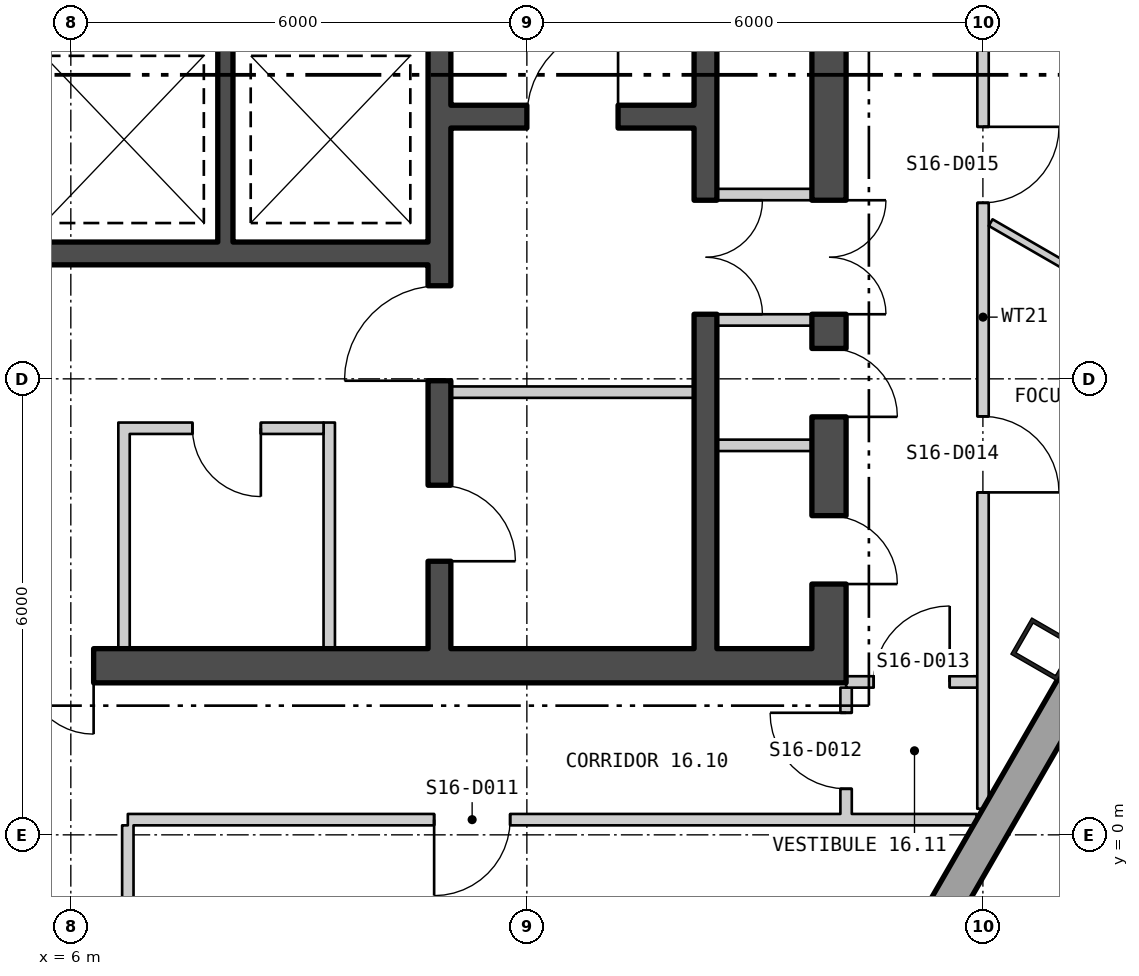
"""IFC4 building model, lengths in metres.
Left out: names, types, materials, properties, quantities, classifications, styles, units other than length and angle.
Written with IfcOpenShell. Run it as: python <this file> out.ifc"""

import sys

from ifc_helpers import new_model, si_unit, direction, frame, frame_2d, origin, origin_2d, place, context, subcontext, project, spatial, polyline, rectangle, hollow_rectangle, outline, extrude, element, fill, save


model = new_model("IFC4")
c1 = context("Model", 3, precision=1e-05, world=origin(), true_north=direction((0.0, 1.0)))
c2 = subcontext(c1, "Body", "Model", "MODEL_VIEW")
j1 = project(units=[si_unit("LENGTHUNIT", "METRE"), si_unit("PLANEANGLEUNIT", "RADIAN")], contexts=[c1])
p1 = place(None, origin())
s1 = spatial("IfcSite", under=j1, at=p1, CompositionType="ELEMENT")
p2 = place(p1, origin())
s2 = spatial("IfcBuilding", under=s1, at=p2, CompositionType="ELEMENT")
p3 = place(p2, frame((0.0, 0.0, 216.0)))
s3 = spatial("IfcBuildingStorey", under=s2, at=p3, CompositionType="ELEMENT", Elevation=216.0)
p4 = place(p3, frame((18.808, 2.441, 0.0), z_axis=(0.0, 0.0, 1.0), x_axis=(0.5, 0.866025403784, 0.0)))
e1 = element("IfcColumn", 1, at=p4, inside=s3, PredefinedType="COLUMN", context=c2, shape_type="SweptSolid", body=[
    extrude(hollow_rectangle(XDim=0.55, YDim=0.7, WallThickness=0.05, at=origin_2d()), origin(), (0.0, 0.0, 1.0), 3.9),
])
p5 = place(p3, frame((3.36, -25.466, -0.18), z_axis=(0.0, 0.0, 1.0), x_axis=(0.500000335318, 0.866025210188, 0.0)))
e2 = element("IfcWall", 2, at=p5, inside=s3, PredefinedType="SOLIDWALL", context=c2, shape_type="SweptSolid", body=[
    extrude(outline(polyline([(-0.13, -0.225), (45.88, -0.225), (45.62, 0.225), (0.13, 0.225), (-0.13, -0.225)])), origin(), (0.0, 0.0, 1.0), 3.68),
])
p6 = place(p5, frame((1.425, 0.0, 1.08)))
e3 = element("IfcOpeningElement", 3, at=p6, cuts=e2, PredefinedType="OPENING", context=c2, shape_type="SweptSolid", body=[
    extrude(rectangle(XDim=2.4, YDim=2.0, at=frame_2d((1.2, 1.0))), frame((0.0, 0.235, 0.0), z_axis=(0.0, -1.0, 0.0), x_axis=(1.0, 0.0, 0.0)), (0.0, 0.0, 1.0), 0.47),
])
p7 = place(p5, frame((5.895, 0.0, 1.08)))
e4 = element("IfcOpeningElement", 4, at=p7, cuts=e2, PredefinedType="OPENING", context=c2, shape_type="SweptSolid", body=[
    extrude(rectangle(XDim=2.4, YDim=2.0, at=frame_2d((1.2, 1.0))), frame((0.0, 0.235, 0.0), z_axis=(0.0, -1.0, 0.0), x_axis=(1.0, 0.0, 0.0)), (0.0, 0.0, 1.0), 0.47),
])
p8 = place(p5, frame((10.403, 0.0, 1.08)))
e5 = element("IfcOpeningElement", 5, at=p8, cuts=e2, PredefinedType="OPENING", context=c2, shape_type="SweptSolid", body=[
    extrude(rectangle(XDim=2.4, YDim=2.0, at=frame_2d((1.2, 1.0))), frame((0.0, 0.235, 0.0), z_axis=(0.0, -1.0, 0.0), x_axis=(1.0, 0.0, 0.0)), (0.0, 0.0, 1.0), 0.47),
])
p9 = place(p5, frame((14.912, 0.0, 1.08)))
e6 = element("IfcOpeningElement", 6, at=p9, cuts=e2, PredefinedType="OPENING", context=c2, shape_type="SweptSolid", body=[
    extrude(rectangle(XDim=2.4, YDim=2.0, at=frame_2d((1.2, 1.0))), frame((0.0, 0.235, 0.0), z_axis=(0.0, -1.0, 0.0), x_axis=(1.0, 0.0, 0.0)), (0.0, 0.0, 1.0), 0.47),
])
p10 = place(p5, frame((19.421, 0.0, 1.08)))
e7 = element("IfcOpeningElement", 7, at=p10, cuts=e2, PredefinedType="OPENING", context=c2, shape_type="SweptSolid", body=[
    extrude(rectangle(XDim=2.4, YDim=2.0, at=frame_2d((1.2, 1.0))), frame((0.0, 0.235, 0.0), z_axis=(0.0, -1.0, 0.0), x_axis=(1.0, 0.0, 0.0)), (0.0, 0.0, 1.0), 0.47),
])
p11 = place(p5, frame((23.929, 0.0, 1.08)))
e8 = element("IfcOpeningElement", 8, at=p11, cuts=e2, PredefinedType="OPENING", context=c2, shape_type="SweptSolid", body=[
    extrude(rectangle(XDim=2.4, YDim=2.0, at=frame_2d((1.2, 1.0))), frame((0.0, 0.235, 0.0), z_axis=(0.0, -1.0, 0.0), x_axis=(1.0, 0.0, 0.0)), (0.0, 0.0, 1.0), 0.47),
])
p12 = place(p5, frame((32.947, 0.0, 1.08)))
e9 = element("IfcOpeningElement", 9, at=p12, cuts=e2, PredefinedType="OPENING", context=c2, shape_type="SweptSolid", body=[
    extrude(rectangle(XDim=2.4, YDim=2.0, at=frame_2d((1.2, 1.0))), frame((0.0, 0.235, 0.0), z_axis=(0.0, -1.0, 0.0), x_axis=(1.0, 0.0, 0.0)), (0.0, 0.0, 1.0), 0.47),
])
p13 = place(p5, frame((37.455, 0.0, 1.08)))
e10 = element("IfcOpeningElement", 10, at=p13, cuts=e2, PredefinedType="OPENING", context=c2, shape_type="SweptSolid", body=[
    extrude(rectangle(XDim=2.4, YDim=2.0, at=frame_2d((1.2, 1.0))), frame((0.0, 0.235, 0.0), z_axis=(0.0, -1.0, 0.0), x_axis=(1.0, 0.0, 0.0)), (0.0, 0.0, 1.0), 0.47),
])
p14 = place(p5, frame((41.925, 0.0, 1.08)))
e11 = element("IfcOpeningElement", 11, at=p14, cuts=e2, PredefinedType="OPENING", context=c2, shape_type="SweptSolid", body=[
    extrude(rectangle(XDim=2.4, YDim=2.0, at=frame_2d((1.2, 1.0))), frame((0.0, 0.235, 0.0), z_axis=(0.0, -1.0, 0.0), x_axis=(1.0, 0.0, 0.0)), (0.0, 0.0, 1.0), 0.47),
])
p15 = place(p3, frame((-16.2, 2.225, 0.0), z_axis=(0.0, 0.0, 1.0), x_axis=(1.0, 0.0, 0.0)))
e12 = element("IfcWall", 12, at=p15, inside=s3, PredefinedType="SHEAR", context=c2, shape_type="SweptSolid", body=[
    extrude(rectangle(XDim=32.4, YDim=0.45, at=frame_2d((16.2, 0.0))), origin(), (0.0, 0.0, 1.0), 3.7),
])
p16 = place(p15, frame((10.7, 0.0, 0.0)))
e13 = element("IfcOpeningElement", 13, at=p16, cuts=e12, PredefinedType="OPENING", context=c2, shape_type="SweptSolid", body=[
    extrude(rectangle(XDim=1.8, YDim=2.4, at=frame_2d((0.9, 1.2))), frame((0.0, 0.235, 0.0), z_axis=(0.0, -1.0, 0.0), x_axis=(1.0, 0.0, 0.0)), (0.0, 0.0, 1.0), 0.47),
])
p17 = place(p15, frame((20.7, 0.0, 0.0)))
e14 = element("IfcOpeningElement", 14, at=p17, cuts=e12, PredefinedType="OPENING", context=c2, shape_type="SweptSolid", body=[
    extrude(rectangle(XDim=1.8, YDim=2.4, at=frame_2d((0.9, 1.2))), frame((0.0, 0.235, 0.0), z_axis=(0.0, -1.0, 0.0), x_axis=(1.0, 0.0, 0.0)), (0.0, 0.0, 1.0), 0.47),
])
p18 = place(p3, frame((15.975, 2.45, 0.0), z_axis=(0.0, 0.0, 1.0), x_axis=(0.0, 1.0, 0.0)))
e15 = element("IfcWall", 15, at=p18, inside=s3, PredefinedType="SHEAR", context=c2, shape_type="SweptSolid", body=[
    extrude(rectangle(XDim=15.1, YDim=0.45, at=frame_2d((7.55, 0.0))), origin(), (0.0, 0.0, 1.0), 3.7),
])
p19 = place(p18, frame((4.4, 0.0, 0.0)))
e16 = element("IfcOpeningElement", 16, at=p19, cuts=e15, PredefinedType="OPENING", context=c2, shape_type="SweptSolid", body=[
    extrude(rectangle(XDim=1.5, YDim=2.1, at=frame_2d((0.75, 1.05))), frame((0.0, 0.235, 0.0), z_axis=(0.0, -1.0, 0.0), x_axis=(1.0, 0.0, 0.0)), (0.0, 0.0, 1.0), 0.47),
])
p20 = place(p18, frame((0.85, 0.0, 0.0)))
e17 = element("IfcOpeningElement", 17, at=p20, cuts=e15, PredefinedType="OPENING", context=c2, shape_type="SweptSolid", body=[
    extrude(rectangle(XDim=0.9, YDim=2.1, at=frame_2d((0.45, 1.05))), frame((0.0, 0.235, 0.0), z_axis=(0.0, -1.0, 0.0), x_axis=(1.0, 0.0, 0.0)), (0.0, 0.0, 1.0), 0.47),
])
p21 = place(p18, frame((3.05, 0.0, 0.0)))
e18 = element("IfcOpeningElement", 18, at=p21, cuts=e15, PredefinedType="OPENING", context=c2, shape_type="SweptSolid", body=[
    extrude(rectangle(XDim=0.9, YDim=2.1, at=frame_2d((0.45, 1.05))), frame((0.0, 0.235, 0.0), z_axis=(0.0, -1.0, 0.0), x_axis=(1.0, 0.0, 0.0)), (0.0, 0.0, 1.0), 0.47),
])
p22 = place(p18, frame((9.029, 0.0, 0.0)))
e19 = element("IfcOpeningElement", 19, at=p22, cuts=e15, PredefinedType="OPENING", context=c2, shape_type="SweptSolid", body=[
    extrude(rectangle(XDim=0.9, YDim=2.1, at=frame_2d((0.45, 1.05))), frame((0.0, 0.235, 0.0), z_axis=(0.0, -1.0, 0.0), x_axis=(1.0, 0.0, 0.0)), (0.0, 0.0, 1.0), 0.47),
])
p23 = place(p18, frame((13.579, 0.0, 0.0)))
e20 = element("IfcOpeningElement", 20, at=p23, cuts=e15, PredefinedType="OPENING", context=c2, shape_type="SweptSolid", body=[
    extrude(rectangle(XDim=1.0, YDim=2.1, at=frame_2d((0.5, 1.05))), frame((0.0, 0.235, 0.0), z_axis=(0.0, -1.0, 0.0), x_axis=(1.0, 0.0, 0.0)), (0.0, 0.0, 1.0), 0.47),
])
p24 = place(p3, frame((10.85, 2.45, 0.0), z_axis=(0.0, 0.0, 1.0), x_axis=(0.0, 1.0, 0.0)))
e21 = element("IfcWall", 21, at=p24, inside=s3, PredefinedType="SHEAR", context=c2, shape_type="SweptSolid", body=[
    extrude(rectangle(XDim=15.1, YDim=0.3, at=frame_2d((7.55, 0.0))), origin(), (0.0, 0.0, 1.0), 3.7),
])
p25 = place(p24, frame((3.525, 0.0, 0.0)))
e22 = element("IfcOpeningElement", 22, at=p25, cuts=e21, PredefinedType="OPENING", context=c2, shape_type="SweptSolid", body=[
    extrude(rectangle(XDim=1.25, YDim=2.1, at=frame_2d((0.625, 1.05))), frame((0.0, 0.16, 0.0), z_axis=(0.0, -1.0, 0.0), x_axis=(1.0, 0.0, 0.0)), (0.0, 0.0, 1.0), 0.32),
])
p26 = place(p24, frame((1.15, 0.0, 0.0)))
e23 = element("IfcOpeningElement", 23, at=p26, cuts=e21, PredefinedType="OPENING", context=c2, shape_type="SweptSolid", body=[
    extrude(rectangle(XDim=1.0, YDim=2.1, at=frame_2d((0.5, 1.05))), frame((0.0, 0.16, 0.0), z_axis=(0.0, -1.0, 0.0), x_axis=(1.0, 0.0, 0.0)), (0.0, 0.0, 1.0), 0.32),
])
p27 = place(p3, frame((14.35, 2.45, 0.0), z_axis=(0.0, 0.0, 1.0), x_axis=(0.0, 1.0, 0.0)))
e24 = element("IfcWall", 24, at=p27, inside=s3, PredefinedType="SHEAR", context=c2, shape_type="SweptSolid", body=[
    extrude(rectangle(XDim=15.1, YDim=0.3, at=frame_2d((7.55, 0.0))), origin(), (0.0, 0.0, 1.0), 3.7),
])
p28 = place(p27, frame((4.4, 0.0, 0.0)))
e25 = element("IfcOpeningElement", 25, at=p28, cuts=e24, PredefinedType="OPENING", context=c2, shape_type="SweptSolid", body=[
    extrude(rectangle(XDim=1.5, YDim=2.1, at=frame_2d((0.75, 1.05))), frame((0.0, 0.16, 0.0), z_axis=(0.0, -1.0, 0.0), x_axis=(1.0, 0.0, 0.0)), (0.0, 0.0, 1.0), 0.32),
])
p29 = place(p3, frame((11.0, 9.45, 0.0), z_axis=(0.0, 0.0, 1.0), x_axis=(1.0, 0.0, 0.0)))
e26 = element("IfcWall", 26, at=p29, inside=s3, PredefinedType="SHEAR", context=c2, shape_type="SweptSolid", body=[
    extrude(rectangle(XDim=3.2, YDim=0.3, at=frame_2d((1.6, 0.0))), origin(), (0.0, 0.0, 1.0), 3.7),
])
p30 = place(p29, frame((1.0, 0.0, 0.0)))
e27 = element("IfcOpeningElement", 27, at=p30, cuts=e26, PredefinedType="OPENING", context=c2, shape_type="SweptSolid", body=[
    extrude(rectangle(XDim=1.2, YDim=2.1, at=frame_2d((0.6, 1.05))), frame((0.0, 0.16, 0.0), z_axis=(0.0, -1.0, 0.0), x_axis=(1.0, 0.0, 0.0)), (0.0, 0.0, 1.0), 0.32),
])
p31 = place(p3, frame((2.6, 7.65, 0.0), z_axis=(0.0, 0.0, 1.0), x_axis=(1.0, 0.0, 0.0)))
e28 = element("IfcWall", 28, at=p31, inside=s3, PredefinedType="SHEAR", context=c2, shape_type="SweptSolid", body=[
    extrude(rectangle(XDim=8.1, YDim=0.3, at=frame_2d((4.05, 0.0))), origin(), (0.0, 0.0, 1.0), 3.7),
])
p32 = place(p3, frame((8.033, 7.8, 0.0), z_axis=(0.0, 0.0, 1.0), x_axis=(0.0, 1.0, 0.0)))
e29 = element("IfcWall", 29, at=p32, inside=s3, PredefinedType="SHEAR", context=c2, shape_type="SweptSolid", body=[
    extrude(rectangle(XDim=2.7, YDim=0.2, at=frame_2d((1.35, 0.0))), origin(), (0.0, 0.0, 1.0), 3.7),
])
p33 = place(p3, frame((11.0, 5.825, 0.0), z_axis=(0.0, 0.0, 1.0), x_axis=(1.0, 0.0, 0.0)))
e30 = element("IfcWall", 30, at=p33, inside=s3, PredefinedType="PARTITIONING", context=c2, shape_type="SweptSolid", body=[
    extrude(rectangle(XDim=3.2, YDim=0.15, at=frame_2d((1.6, 0.0))), origin(), (0.0, 0.0, 1.0), 3.7),
])
for number, where, z_axis, x_axis in (
    (31, (14.5, 6.775, 0.0), (0.0, 0.0, 1.0), (1.0, 0.0, 0.0)),
    (32, (14.5, 8.425, 0.0), (0.0, 0.0, 1.0), (1.0, 0.0, 0.0)),
    (33, (14.5, 5.125, 0.0), (0.0, 0.0, 1.0), (1.0, 0.0, 0.0)),
):
    element("IfcWall", number, at=place(p3, frame(where, z_axis=z_axis, x_axis=x_axis)), inside=s3, PredefinedType="PARTITIONING", context=c2, shape_type="SweptSolid", body=[
        extrude(rectangle(XDim=1.25, YDim=0.15, at=frame_2d((0.625, 0.0))), origin(), (0.0, 0.0, 1.0), 3.7),
    ])
for number, where, z_axis, x_axis in (
    (34, (6.7, 2.45, 0.0), (0.0, 0.0, 1.0), (0.0, 1.0, 0.0)),
    (35, (9.4, 2.45, 0.0), (0.0, 0.0, 1.0), (0.0, 1.0, 0.0)),
):
    element("IfcWall", number, at=place(p3, frame(where, z_axis=z_axis, x_axis=x_axis)), inside=s3, PredefinedType="PARTITIONING", context=c2, shape_type="SweptSolid", body=[
        extrude(rectangle(XDim=2.975, YDim=0.15, at=frame_2d((1.488, 0.0))), origin(), (0.0, 0.0, 1.0), 3.7),
    ])
p34 = place(p3, frame((6.775, 5.35, 0.0), z_axis=(0.0, 0.0, 1.0), x_axis=(1.0, 0.0, 0.0)))
e36 = element("IfcWall", 36, at=p34, inside=s3, PredefinedType="PARTITIONING", context=c2, shape_type="SweptSolid", body=[
    extrude(rectangle(XDim=2.55, YDim=0.15, at=frame_2d((1.275, 0.0))), origin(), (0.0, 0.0, 1.0), 3.7),
])
p35 = place(p34, frame((0.825, 0.0, 0.0)))
e37 = element("IfcOpeningElement", 37, at=p35, cuts=e36, PredefinedType="OPENING", context=c2, shape_type="SweptSolid", body=[
    extrude(rectangle(XDim=0.9, YDim=2.1, at=frame_2d((0.45, 1.05))), frame((0.0, 0.085, 0.0), z_axis=(0.0, -1.0, 0.0), x_axis=(1.0, 0.0, 0.0)), (0.0, 0.0, 1.0), 0.17),
])
p36 = place(p3, frame((6.75, -1.125, 0.0), z_axis=(0.0, 0.0, 1.0), x_axis=(0.0, 1.0, 0.0)))
e38 = element("IfcWall", 38, at=p36, inside=s3, PredefinedType="PARTITIONING", context=c2, shape_type="SweptSolid", body=[
    extrude(rectangle(XDim=1.25, YDim=0.15, at=frame_2d((0.625, 0.0))), origin(), (0.0, 0.0, 1.0), 3.7),
])
p37 = place(p3, frame((6.75, 0.2, 0.0), z_axis=(0.0, 0.0, 1.0), x_axis=(1.0, 0.0, 0.0)))
e39 = element("IfcWall", 39, at=p37, inside=s3, PredefinedType="PARTITIONING", context=c2, shape_type="SweptSolid", body=[
    extrude(rectangle(XDim=11.168, YDim=0.15, at=frame_2d((5.584, 0.0))), origin(), (0.0, 0.0, 1.0), 3.7),
])
p38 = place(p37, frame((4.03, 0.0, 0.0)))
e40 = element("IfcOpeningElement", 40, at=p38, cuts=e39, PredefinedType="OPENING", context=c2, shape_type="SweptSolid", body=[
    extrude(rectangle(XDim=1.0, YDim=2.1, at=frame_2d((0.5, 1.05))), frame((0.0, 0.085, 0.0), z_axis=(0.0, -1.0, 0.0), x_axis=(1.0, 0.0, 0.0)), (0.0, 0.0, 1.0), 0.17),
])
p39 = place(p3, frame((16.2, 0.275, 0.0), z_axis=(0.0, 0.0, 1.0), x_axis=(0.0, 1.0, 0.0)))
e41 = element("IfcWall", 41, at=p39, inside=s3, PredefinedType="PARTITIONING", context=c2, shape_type="SweptSolid", body=[
    extrude(rectangle(XDim=1.662, YDim=0.15, at=frame_2d((0.831, 0.0))), origin(), (0.0, 0.0, 1.0), 3.7),
])
p40 = place(p39, frame((0.331, 0.0, 0.0)))
e42 = element("IfcOpeningElement", 42, at=p40, cuts=e41, PredefinedType="OPENING", context=c2, shape_type="SweptSolid", body=[
    extrude(rectangle(XDim=1.0, YDim=2.1, at=frame_2d((0.5, 1.05))), frame((0.0, 0.085, 0.0), z_axis=(0.0, -1.0, 0.0), x_axis=(1.0, 0.0, 0.0)), (0.0, 0.0, 1.0), 0.17),
])
p41 = place(p3, frame((16.2, 2.012, 0.0), z_axis=(0.0, 0.0, 1.0), x_axis=(1.0, 0.0, 0.0)))
e43 = element("IfcWall", 43, at=p41, inside=s3, PredefinedType="PARTITIONING", context=c2, shape_type="SweptSolid", body=[
    extrude(rectangle(XDim=1.726, YDim=0.15, at=frame_2d((0.863, 0.0))), origin(), (0.0, 0.0, 1.0), 3.11),
])
p42 = place(p41, frame((0.363, 0.0, 0.0)))
e44 = element("IfcOpeningElement", 44, at=p42, cuts=e43, PredefinedType="OPENING", context=c2, shape_type="SweptSolid", body=[
    extrude(rectangle(XDim=1.0, YDim=2.1, at=frame_2d((0.5, 1.05))), frame((0.0, 0.085, 0.0), z_axis=(0.0, -1.0, 0.0), x_axis=(1.0, 0.0, 0.0)), (0.0, 0.0, 1.0), 0.17),
])
p43 = place(p3, frame((18.001, 0.343, 0.0), z_axis=(0.0, 0.0, 1.0), x_axis=(7.7291699e-05, 0.999999997013, 0.0)))
e45 = element("IfcWall", 45, at=p43, inside=s3, PredefinedType="PARTITIONING", context=c2, shape_type="SweptSolid", body=[
    extrude(rectangle(XDim=12.938, YDim=0.15, at=frame_2d((6.469, 0.0))), origin(), (0.0, 0.0, 1.0), 3.7),
])
p44 = place(p43, frame((4.163, 0.0, 0.0)))
e46 = element("IfcOpeningElement", 46, at=p44, cuts=e45, PredefinedType="OPENING", context=c2, shape_type="SweptSolid", body=[
    extrude(rectangle(XDim=1.0, YDim=2.1, at=frame_2d((0.5, 1.05))), frame((0.0, 0.085, 0.0), z_axis=(0.0, -1.0, 0.0), x_axis=(1.0, 0.0, 0.0)), (0.0, 0.0, 1.0), 0.17),
])
p45 = place(p43, frame((7.973, 0.0, 0.0)))
e47 = element("IfcOpeningElement", 47, at=p45, cuts=e45, PredefinedType="OPENING", context=c2, shape_type="SweptSolid", body=[
    extrude(rectangle(XDim=1.0, YDim=2.1, at=frame_2d((0.5, 1.05))), frame((0.0, 0.085, 0.0), z_axis=(0.0, -1.0, 0.0), x_axis=(1.0, 0.0, 0.0)), (0.0, 0.0, 1.0), 0.17),
])
p46 = place(p3, frame((18.102, 8.056, 0.0), z_axis=(0.0, 0.0, 1.0), x_axis=(0.865934672737, -0.500157117865, 0.0)))
e48 = element("IfcWall", 48, at=p46, inside=s3, PredefinedType="PARTITIONING", context=c2, shape_type="SweptSolid", body=[
    extrude(rectangle(XDim=3.319, YDim=0.1, at=frame_2d((1.659, 0.0))), origin(), (0.0, 0.0, 1.0), 3.7),
])
p47 = place(p30, origin())
e49 = element("IfcDoor", 49, at=p47, inside=s3, OperationType="SINGLE_SWING_LEFT", PredefinedType="DOOR", context=c2, shape_type="SweptSolid", body=[
    extrude(rectangle(XDim=1.2, YDim=2.1, at=frame_2d((0.6, 1.05))), frame((0.0, 0.025, 0.0), z_axis=(0.0, -1.0, 0.0), x_axis=(1.0, 0.0, 0.0)), (0.0, 0.0, 1.0), 0.05),
])
fill(e27, e49)
p48 = place(p25, origin())
e50 = element("IfcDoor", 50, at=p48, inside=s3, OperationType="SINGLE_SWING_RIGHT", PredefinedType="DOOR", context=c2, shape_type="SweptSolid", body=[
    extrude(rectangle(XDim=1.25, YDim=2.1, at=frame_2d((0.625, 1.05))), frame((0.0, 0.025, 0.0), z_axis=(0.0, -1.0, 0.0), x_axis=(1.0, 0.0, 0.0)), (0.0, 0.0, 1.0), 0.05),
])
fill(e22, e50)
p49 = place(p26, origin())
e51 = element("IfcDoor", 51, at=p49, inside=s3, OperationType="SINGLE_SWING_LEFT", PredefinedType="DOOR", context=c2, shape_type="SweptSolid", body=[
    extrude(rectangle(XDim=1.0, YDim=2.1, at=frame_2d((0.5, 1.05))), frame((0.0, 0.025, 0.0), z_axis=(0.0, -1.0, 0.0), x_axis=(1.0, 0.0, 0.0)), (0.0, 0.0, 1.0), 0.05),
])
fill(e23, e51)
p50 = place(p28, origin())
e52 = element("IfcDoor", 52, at=p50, inside=s3, OperationType="DOUBLE_DOOR_SINGLE_SWING", PredefinedType="DOOR", context=c2, shape_type="SweptSolid", body=[
    extrude(rectangle(XDim=1.5, YDim=2.1, at=frame_2d((0.75, 1.05))), frame((0.0, 0.025, 0.0), z_axis=(0.0, -1.0, 0.0), x_axis=(1.0, 0.0, 0.0)), (0.0, 0.0, 1.0), 0.05),
])
fill(e25, e52)
p51 = place(p19, origin())
e53 = element("IfcDoor", 53, at=p51, inside=s3, OperationType="DOUBLE_DOOR_SINGLE_SWING", PredefinedType="DOOR", context=c2, shape_type="SweptSolid", body=[
    extrude(rectangle(XDim=1.5, YDim=2.1, at=frame_2d((0.75, 1.05))), frame((0.0, 0.025, 0.0), z_axis=(0.0, -1.0, 0.0), x_axis=(1.0, 0.0, 0.0)), (0.0, 0.0, 1.0), 0.05),
])
fill(e16, e53)
p52 = place(p20, origin())
e54 = element("IfcDoor", 54, at=p52, inside=s3, OperationType="SINGLE_SWING_LEFT", PredefinedType="DOOR", context=c2, shape_type="SweptSolid", body=[
    extrude(rectangle(XDim=0.9, YDim=2.1, at=frame_2d((0.45, 1.05))), frame((0.0, 0.025, 0.0), z_axis=(0.0, -1.0, 0.0), x_axis=(1.0, 0.0, 0.0)), (0.0, 0.0, 1.0), 0.05),
])
fill(e17, e54)
p53 = place(p21, origin())
e55 = element("IfcDoor", 55, at=p53, inside=s3, OperationType="SINGLE_SWING_LEFT", PredefinedType="DOOR", context=c2, shape_type="SweptSolid", body=[
    extrude(rectangle(XDim=0.9, YDim=2.1, at=frame_2d((0.45, 1.05))), frame((0.0, 0.025, 0.0), z_axis=(0.0, -1.0, 0.0), x_axis=(1.0, 0.0, 0.0)), (0.0, 0.0, 1.0), 0.05),
])
fill(e18, e55)
p54 = place(p35, origin())
e56 = element("IfcDoor", 56, at=p54, inside=s3, OperationType="SINGLE_SWING_RIGHT", PredefinedType="DOOR", context=c2, shape_type="SweptSolid", body=[
    extrude(rectangle(XDim=0.9, YDim=2.1, at=frame_2d((0.45, 1.05))), frame((0.0, 0.025, 0.0), z_axis=(0.0, -1.0, 0.0), x_axis=(1.0, 0.0, 0.0)), (0.0, 0.0, 1.0), 0.05),
])
fill(e37, e56)
p55 = place(p17, origin())
e57 = element("IfcDoor", 57, at=p55, inside=s3, OperationType="DOUBLE_DOOR_SINGLE_SWING", PredefinedType="DOOR", context=c2, shape_type="SweptSolid", body=[
    extrude(rectangle(XDim=1.8, YDim=2.4, at=frame_2d((0.9, 1.2))), frame((0.0, 0.025, 0.0), z_axis=(0.0, -1.0, 0.0), x_axis=(1.0, 0.0, 0.0)), (0.0, 0.0, 1.0), 0.05),
])
fill(e14, e57)
p56 = place(p38, origin())
e58 = element("IfcDoor", 58, at=p56, inside=s3, OperationType="SINGLE_SWING_LEFT", PredefinedType="DOOR", context=c2, shape_type="SweptSolid", body=[
    extrude(rectangle(XDim=1.0, YDim=2.1, at=frame_2d((0.5, 1.05))), frame((0.0, 0.025, 0.0), z_axis=(0.0, -1.0, 0.0), x_axis=(1.0, 0.0, 0.0)), (0.0, 0.0, 1.0), 0.05),
])
fill(e40, e58)
p57 = place(p40, origin())
e59 = element("IfcDoor", 59, at=p57, inside=s3, OperationType="SINGLE_SWING_LEFT", PredefinedType="DOOR", context=c2, shape_type="SweptSolid", body=[
    extrude(rectangle(XDim=1.0, YDim=2.1, at=frame_2d((0.5, 1.05))), frame((0.0, 0.025, 0.0), z_axis=(0.0, -1.0, 0.0), x_axis=(1.0, 0.0, 0.0)), (0.0, 0.0, 1.0), 0.05),
])
fill(e42, e59)
p58 = place(p42, origin())
e60 = element("IfcDoor", 60, at=p58, inside=s3, OperationType="SINGLE_SWING_LEFT", PredefinedType="DOOR", context=c2, shape_type="SweptSolid", body=[
    extrude(rectangle(XDim=1.0, YDim=2.1, at=frame_2d((0.5, 1.05))), frame((0.0, 0.025, 0.0), z_axis=(0.0, -1.0, 0.0), x_axis=(1.0, 0.0, 0.0)), (0.0, 0.0, 1.0), 0.05),
])
fill(e44, e60)
p59 = place(p44, origin())
e61 = element("IfcDoor", 61, at=p59, inside=s3, OperationType="SINGLE_SWING_LEFT", PredefinedType="DOOR", context=c2, shape_type="SweptSolid", body=[
    extrude(rectangle(XDim=1.0, YDim=2.1, at=frame_2d((0.5, 1.05))), frame((0.0, 0.025, 0.0), z_axis=(0.0, -1.0, 0.0), x_axis=(1.0, 0.0, 0.0)), (0.0, 0.0, 1.0), 0.05),
])
fill(e46, e61)
p60 = place(p45, origin())
e62 = element("IfcDoor", 62, at=p60, inside=s3, OperationType="SINGLE_SWING_RIGHT", PredefinedType="DOOR", context=c2, shape_type="SweptSolid", body=[
    extrude(rectangle(XDim=1.0, YDim=2.1, at=frame_2d((0.5, 1.05))), frame((0.0, 0.025, 0.0), z_axis=(0.0, -1.0, 0.0), x_axis=(1.0, 0.0, 0.0)), (0.0, 0.0, 1.0), 0.05),
])
fill(e47, e62)
save(model, sys.argv[1])
